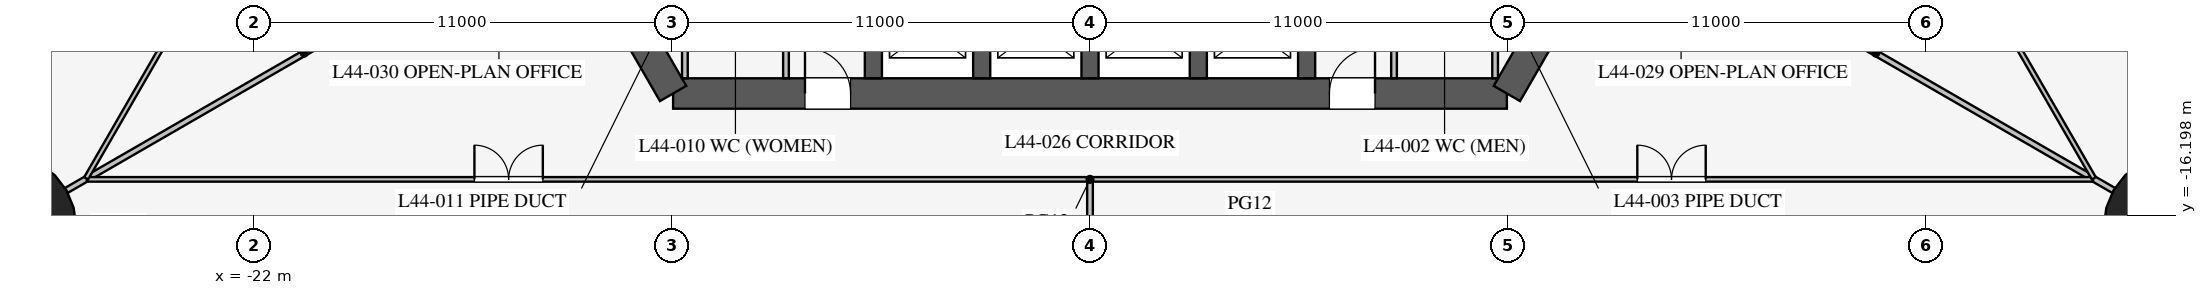
"""IFC4 building model, lengths in metres.
Left out: names, types, materials, properties, quantities, classifications, styles, units other than length and angle.
Written with IfcOpenShell. Run it as: python <this file> out.ifc"""

import sys

from ifc_helpers import new_model, si_unit, direction, frame, frame_2d, origin, origin_2d, place, context, subcontext, project, spatial, rectangle, circle, extrude, element, fill, save


model = new_model("IFC4")
c1 = context("Model", 3, precision=1e-05, world=origin(), true_north=direction((0.0, 1.0)))
c2 = subcontext(c1, "Body", "Model", "MODEL_VIEW")
j1 = project(units=[si_unit("LENGTHUNIT", "METRE"), si_unit("PLANEANGLEUNIT", "RADIAN")], contexts=[c1])
p1 = place(None, origin())
s1 = spatial("IfcSite", under=j1, at=p1, CompositionType="ELEMENT")
p2 = place(p1, origin())
s2 = spatial("IfcBuilding", under=s1, at=p2, CompositionType="ELEMENT")
p3 = place(p2, frame((0.0, 0.0, 193.9)))
s3 = spatial("IfcBuildingStorey", under=s2, at=p3, CompositionType="ELEMENT", Elevation=193.9)
for number, where, z_axis, x_axis in (
    (1, (28.579, -16.5, 0.0), (0.0, 0.0, 1.0), (1.0, 0.0, 0.0)),
    (2, (-28.579, -16.5, 0.0), (0.0, 0.0, 1.0), (1.0, 0.0, 0.0)),
):
    element("IfcColumn", number, at=place(p3, frame(where, z_axis=z_axis, x_axis=x_axis)), inside=s3, PredefinedType="COLUMN", context=c2, shape_type="SweptSolid", body=[
        extrude(circle(Radius=1.9, at=origin_2d()), origin(), (0.0, 0.0, 1.0), 4.2),
    ])
p4 = place(p3, frame((-10.97, -13.0, 0.0), z_axis=(0.0, 0.0, 1.0), x_axis=(1.0, 0.0, 0.0)))
e3 = element("IfcWall", 3, at=p4, inside=s3, PredefinedType="SHEAR", context=c2, shape_type="SweptSolid", body=[
    extrude(rectangle(XDim=21.939, YDim=0.8, at=frame_2d((10.97, 0.0))), origin(), (0.0, 0.0, 1.0), 4.2),
])
p5 = place(p4, frame((17.27, 0.0, 0.0)))
e4 = element("IfcOpeningElement", 4, at=p5, cuts=e3, PredefinedType="OPENING", context=c2, shape_type="SweptSolid", body=[
    extrude(rectangle(XDim=1.2, YDim=2.1, at=frame_2d((0.6, 1.05))), frame((0.0, 0.41, 0.0), z_axis=(0.0, -1.0, 0.0), x_axis=(1.0, 0.0, 0.0)), (0.0, 0.0, 1.0), 0.82),
])
p6 = place(p4, frame((3.47, 0.0, 0.0)))
e5 = element("IfcOpeningElement", 5, at=p6, cuts=e3, PredefinedType="OPENING", context=c2, shape_type="SweptSolid", body=[
    extrude(rectangle(XDim=1.2, YDim=2.1, at=frame_2d((0.6, 1.05))), frame((0.0, 0.41, 0.0), z_axis=(0.0, -1.0, 0.0), x_axis=(1.0, 0.0, 0.0)), (0.0, 0.0, 1.0), 0.82),
])
for number, where, z_axis, x_axis in (
    (6, (10.97, -13.0, 0.0), (0.0, 0.0, 1.0), (0.5, 0.866, 0.0)),
    (7, (-16.743, -3.0, 0.0), (0.0, 0.0, 1.0), (0.5, -0.866, 0.0)),
):
    element("IfcWall", number, at=place(p3, frame(where, z_axis=z_axis, x_axis=x_axis)), inside=s3, PredefinedType="SHEAR", context=c2, shape_type="SweptSolid", body=[
        extrude(rectangle(XDim=11.547, YDim=0.8, at=frame_2d((5.773, 0.0))), origin(), (0.0, 0.0, 1.0), 4.2),
    ])
for number, where, z_axis, x_axis in (
    (8, (-5.7, -10.025, 0.0), (0.0, 0.0, 1.0), (0.0, -1.0, 0.0)),
    (9, (-2.85, -10.025, 0.0), (0.0, 0.0, 1.0), (0.0, -1.0, 0.0)),
    (10, (0.0, -10.025, 0.0), (0.0, 0.0, 1.0), (0.0, -1.0, 0.0)),
    (11, (2.85, -10.025, 0.0), (0.0, 0.0, 1.0), (0.0, -1.0, 0.0)),
    (12, (5.7, -10.025, 0.0), (0.0, 0.0, 1.0), (0.0, -1.0, 0.0)),
):
    element("IfcWall", number, at=place(p3, frame(where, z_axis=z_axis, x_axis=x_axis)), inside=s3, PredefinedType="SHEAR", context=c2, shape_type="SweptSolid", body=[
        extrude(rectangle(XDim=2.575, YDim=0.45, at=frame_2d((1.288, 0.0))), origin(), (0.0, 0.0, 1.0), 4.2),
    ])
p7 = place(p3, frame((8.0, -7.5, 0.0), z_axis=(0.0, 0.0, 1.0), x_axis=(0.0, -1.0, 0.0)))
e13 = element("IfcWall", 13, at=p7, inside=s3, PredefinedType="PARTITIONING", context=c2, shape_type="SweptSolid", body=[
    extrude(rectangle(XDim=5.1, YDim=0.15, at=frame_2d((2.55, 0.0))), origin(), (0.0, 0.0, 1.0), 4.0),
])
p8 = place(p7, frame((1.3, 0.0, 0.0)))
e14 = element("IfcOpeningElement", 14, at=p8, cuts=e13, PredefinedType="OPENING", context=c2, shape_type="SweptSolid", body=[
    extrude(rectangle(XDim=0.9, YDim=2.1, at=frame_2d((0.45, 1.05))), frame((0.0, 0.085, 0.0), z_axis=(0.0, -1.0, 0.0), x_axis=(1.0, 0.0, 0.0)), (0.0, 0.0, 1.0), 0.17),
])
p9 = place(p3, frame((-8.0, -7.5, 0.0), z_axis=(0.0, 0.0, 1.0), x_axis=(0.0, -1.0, 0.0)))
e15 = element("IfcWall", 15, at=p9, inside=s3, PredefinedType="PARTITIONING", context=c2, shape_type="SweptSolid", body=[
    extrude(rectangle(XDim=5.1, YDim=0.15, at=frame_2d((2.55, 0.0))), origin(), (0.0, 0.0, 1.0), 4.0),
])
p10 = place(p9, frame((2.6, 0.0, 0.0)))
e16 = element("IfcOpeningElement", 16, at=p10, cuts=e15, PredefinedType="OPENING", context=c2, shape_type="SweptSolid", body=[
    extrude(rectangle(XDim=0.9, YDim=2.1, at=frame_2d((0.45, 1.05))), frame((0.0, 0.085, 0.0), z_axis=(0.0, -1.0, 0.0), x_axis=(1.0, 0.0, 0.0)), (0.0, 0.0, 1.0), 0.17),
])
for number, where, z_axis, x_axis in (
    (17, (10.66, -8.5, 0.0), (0.0, 0.0, 1.0), (0.0, -1.0, 0.0)),
    (18, (-10.66, -8.5, 0.0), (0.0, 0.0, 1.0), (0.0, -1.0, 0.0)),
):
    element("IfcWall", number, at=place(p3, frame(where, z_axis=z_axis, x_axis=x_axis)), inside=s3, PredefinedType="PARTITIONING", context=c2, shape_type="SweptSolid", body=[
        extrude(rectangle(XDim=4.1, YDim=0.15, at=frame_2d((2.05, 0.0))), origin(), (0.0, 0.0, 1.0), 4.0),
    ])
for number, where, z_axis, x_axis in (
    (19, (14.203, -8.2, 0.0), (0.0, 0.0, 1.0), (0.866, -0.5, 0.0)),
    (20, (-14.203, -8.2, 0.0), (0.0, 0.0, 1.0), (-0.866, -0.5, 0.0)),
):
    element("IfcWall", number, at=place(p3, frame(where, z_axis=z_axis, x_axis=x_axis)), inside=s3, PredefinedType="PARTITIONING", context=c2, shape_type="SweptSolid", body=[
        extrude(rectangle(XDim=14.95, YDim=0.15, at=frame_2d((7.475, 0.0))), origin(), (0.0, 0.0, 1.0), 2.4),
    ])
p11 = place(p3, frame((0.0, -15.32, 0.0), z_axis=(0.0, 0.0, 1.0), x_axis=(0.0, -1.0, 0.0)))
e21 = element("IfcWall", 21, at=p11, inside=s3, PredefinedType="PARTITIONING", context=c2, shape_type="SweptSolid", body=[
    extrude(rectangle(XDim=8.201, YDim=0.15, at=frame_2d((4.1, 0.0))), origin(), (0.0, 0.0, 1.0), 2.992),
])
p12 = place(p3, frame((-26.398, -15.26, 0.0), z_axis=(0.0, 0.0, 1.0), x_axis=(1.0, 0.0, 0.0)))
e22 = element("IfcWall", 22, at=p12, inside=s3, PredefinedType="PARTITIONING", context=c2, shape_type="SweptSolid", body=[
    extrude(rectangle(XDim=52.796, YDim=0.12, at=frame_2d((26.398, 0.0))), origin(), (0.0, 0.0, 1.0), 2.9),
])
p13 = place(p12, frame((10.2, 0.0, 0.15)))
e23 = element("IfcOpeningElement", 23, at=p13, cuts=e22, PredefinedType="OPENING", context=c2, shape_type="SweptSolid", body=[
    extrude(rectangle(XDim=1.8, YDim=2.1, at=frame_2d((0.9, 1.05))), frame((0.0, 0.07, 0.0), z_axis=(0.0, -1.0, 0.0), x_axis=(1.0, 0.0, 0.0)), (0.0, 0.0, 1.0), 0.14),
])
p14 = place(p12, frame((40.8, 0.0, 0.15)))
e24 = element("IfcOpeningElement", 24, at=p14, cuts=e22, PredefinedType="OPENING", context=c2, shape_type="SweptSolid", body=[
    extrude(rectangle(XDim=1.8, YDim=2.1, at=frame_2d((0.9, 1.05))), frame((0.0, 0.07, 0.0), z_axis=(0.0, -1.0, 0.0), x_axis=(1.0, 0.0, 0.0)), (0.0, 0.0, 1.0), 0.14),
])
p15 = place(p3, frame((26.415, -15.231, 0.0), z_axis=(0.0, 0.0, 1.0), x_axis=(-0.50000091641, 0.866024874695, 0.0)))
e25 = element("IfcWall", 25, at=p15, inside=s3, PredefinedType="PARTITIONING", context=c2, shape_type="SweptSolid", body=[
    extrude(rectangle(XDim=52.796, YDim=0.12, at=frame_2d((26.398, 0.0))), origin(), (0.0, 0.0, 1.0), 2.9),
])
p16 = place(p15, frame((10.2, 0.0, 0.15)))
e26 = element("IfcOpeningElement", 26, at=p16, cuts=e25, PredefinedType="OPENING", context=c2, shape_type="SweptSolid", body=[
    extrude(rectangle(XDim=1.8, YDim=2.1, at=frame_2d((0.9, 1.05))), frame((0.0, 0.07, 0.0), z_axis=(0.0, -1.0, 0.0), x_axis=(1.0, 0.0, 0.0)), (0.0, 0.0, 1.0), 0.14),
])
p17 = place(p15, frame((40.8, 0.0, 0.15)))
e27 = element("IfcOpeningElement", 27, at=p17, cuts=e25, PredefinedType="OPENING", context=c2, shape_type="SweptSolid", body=[
    extrude(rectangle(XDim=1.8, YDim=2.1, at=frame_2d((0.9, 1.05))), frame((0.0, 0.07, 0.0), z_axis=(0.0, -1.0, 0.0), x_axis=(1.0, 0.0, 0.0)), (0.0, 0.0, 1.0), 0.14),
])
p18 = place(p3, frame((-0.016, 30.491, 0.0), z_axis=(0.0, 0.0, 1.0), x_axis=(-0.50000091641, -0.866024874695, 0.0)))
e28 = element("IfcWall", 28, at=p18, inside=s3, PredefinedType="PARTITIONING", context=c2, shape_type="SweptSolid", body=[
    extrude(rectangle(XDim=52.796, YDim=0.12, at=frame_2d((26.398, 0.0))), origin(), (0.0, 0.0, 1.0), 2.9),
])
p19 = place(p18, frame((10.2, 0.0, 0.15)))
e29 = element("IfcOpeningElement", 29, at=p19, cuts=e28, PredefinedType="OPENING", context=c2, shape_type="SweptSolid", body=[
    extrude(rectangle(XDim=1.8, YDim=2.1, at=frame_2d((0.9, 1.05))), frame((0.0, 0.07, 0.0), z_axis=(0.0, -1.0, 0.0), x_axis=(1.0, 0.0, 0.0)), (0.0, 0.0, 1.0), 0.14),
])
p20 = place(p18, frame((40.8, 0.0, 0.15)))
e30 = element("IfcOpeningElement", 30, at=p20, cuts=e28, PredefinedType="OPENING", context=c2, shape_type="SweptSolid", body=[
    extrude(rectangle(XDim=1.8, YDim=2.1, at=frame_2d((0.9, 1.05))), frame((0.0, 0.07, 0.0), z_axis=(0.0, -1.0, 0.0), x_axis=(1.0, 0.0, 0.0)), (0.0, 0.0, 1.0), 0.14),
])
p21 = place(p5, origin())
e31 = element("IfcDoor", 31, at=p21, inside=s3, OperationType="SINGLE_SWING_RIGHT", PredefinedType="DOOR", context=c2, shape_type="SweptSolid", body=[
    extrude(rectangle(XDim=1.2, YDim=2.1, at=frame_2d((0.6, 1.05))), frame((0.0, 0.025, 0.0), z_axis=(0.0, -1.0, 0.0), x_axis=(1.0, 0.0, 0.0)), (0.0, 0.0, 1.0), 0.05),
])
fill(e4, e31)
p22 = place(p6, origin())
e32 = element("IfcDoor", 32, at=p22, inside=s3, OperationType="SINGLE_SWING_LEFT", PredefinedType="DOOR", context=c2, shape_type="SweptSolid", body=[
    extrude(rectangle(XDim=1.2, YDim=2.1, at=frame_2d((0.6, 1.05))), frame((0.0, 0.025, 0.0), z_axis=(0.0, -1.0, 0.0), x_axis=(1.0, 0.0, 0.0)), (0.0, 0.0, 1.0), 0.05),
])
fill(e5, e32)
p23 = place(p13, origin())
e33 = element("IfcDoor", 33, at=p23, inside=s3, OperationType="DOUBLE_DOOR_SINGLE_SWING", PredefinedType="DOOR", context=c2, shape_type="SweptSolid", body=[
    extrude(rectangle(XDim=1.8, YDim=2.1, at=frame_2d((0.9, 1.05))), frame((0.0, 0.025, 0.0), z_axis=(0.0, -1.0, 0.0), x_axis=(1.0, 0.0, 0.0)), (0.0, 0.0, 1.0), 0.05),
])
fill(e23, e33)
p24 = place(p14, origin())
e34 = element("IfcDoor", 34, at=p24, inside=s3, OperationType="DOUBLE_DOOR_SINGLE_SWING", PredefinedType="DOOR", context=c2, shape_type="SweptSolid", body=[
    extrude(rectangle(XDim=1.8, YDim=2.1, at=frame_2d((0.9, 1.05))), frame((0.0, 0.025, 0.0), z_axis=(0.0, -1.0, 0.0), x_axis=(1.0, 0.0, 0.0)), (0.0, 0.0, 1.0), 0.05),
])
fill(e24, e34)
save(model, sys.argv[1])
